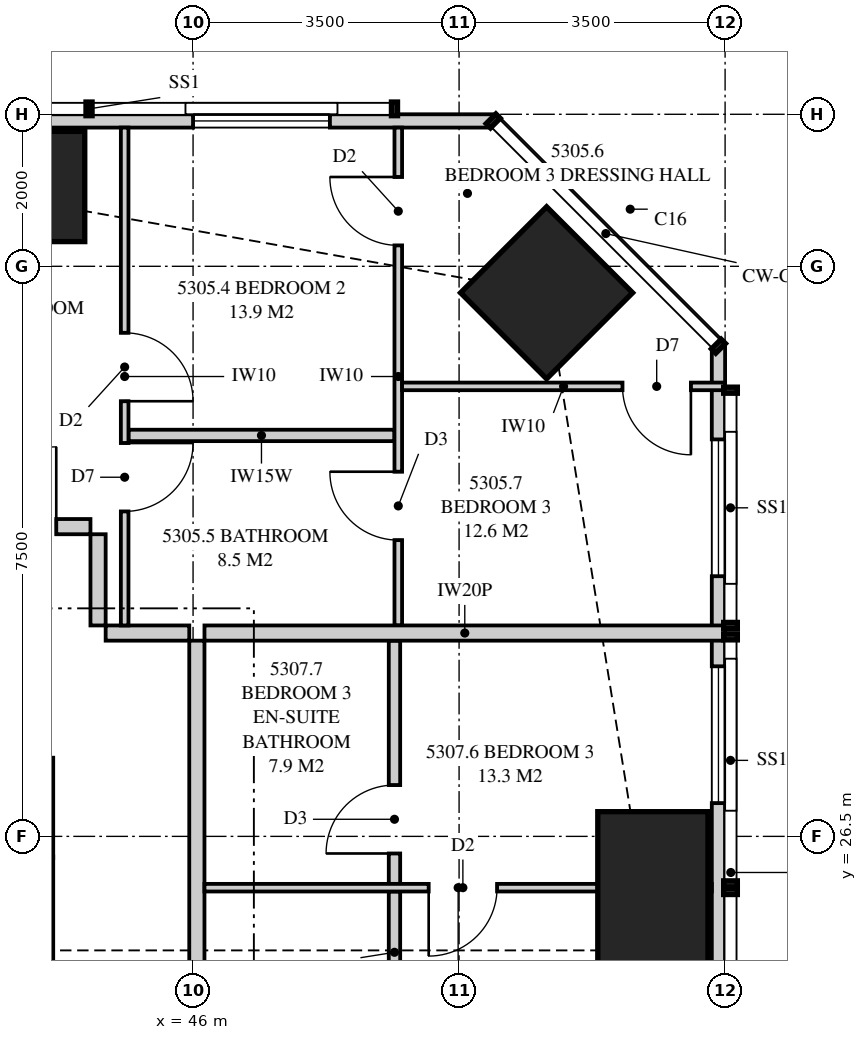
"""IFC4 building model, lengths in metres.
Left out: names, types, materials, properties, quantities, classifications, styles, units other than length and angle.
Written with IfcOpenShell. Run it as: python <this file> out.ifc"""

import sys

from ifc_helpers import new_model, si_unit, direction, frame, frame_2d, origin, origin_2d, place, context, subcontext, project, spatial, polyline, rectangle, outline, extrude, element, fill, save


model = new_model("IFC4")
c1 = context("Model", 3, precision=1e-05, world=origin(), true_north=direction((0.0, 1.0)))
c2 = subcontext(c1, "Body", "Model", "MODEL_VIEW")
j1 = project(units=[si_unit("LENGTHUNIT", "METRE"), si_unit("PLANEANGLEUNIT", "RADIAN")], contexts=[c1])
p1 = place(None, origin())
s1 = spatial("IfcSite", under=j1, at=p1, CompositionType="ELEMENT")
p2 = place(p1, origin())
s2 = spatial("IfcBuilding", under=s1, at=p2, CompositionType="ELEMENT")
p3 = place(p2, frame((0.0, 0.0, 194.55)))
s3 = spatial("IfcBuildingStorey", under=s2, at=p3, CompositionType="ELEMENT", Elevation=194.55)
p4 = place(p3, frame((52.05, 25.0, 0.0), z_axis=(0.0, 0.0, 1.0), x_axis=(1.0, 0.0, 0.0)))
e1 = element("IfcColumn", 1, at=p4, inside=s3, PredefinedType="COLUMN", context=c2, shape_type="SweptSolid", body=[
    extrude(rectangle(XDim=1.45, YDim=3.65, at=origin_2d()), origin(), (0.0, 0.0, 1.0), 3.35),
])
p5 = place(p3, frame((50.652, 33.652, 0.0), z_axis=(0.0, 0.0, 1.0), x_axis=(0.707106781187, 0.707106781187, 0.0)))
e2 = element("IfcColumn", 2, at=p5, inside=s3, PredefinedType="COLUMN", context=c2, shape_type="SweptSolid", body=[
    extrude(rectangle(XDim=1.6, YDim=1.6, at=origin_2d()), origin(), (0.0, 0.0, 1.0), 3.35),
])
p6 = place(p3, frame((42.75, 35.05, 0.0), z_axis=(0.0, 0.0, 1.0), x_axis=(0.0, 1.0, 0.0)))
e3 = element("IfcColumn", 3, at=p6, inside=s3, PredefinedType="COLUMN", context=c2, shape_type="SweptSolid", body=[
    extrude(rectangle(XDim=1.45, YDim=3.65, at=origin_2d()), origin(), (0.0, 0.0, 1.0), 3.35),
])
p7 = place(p3, frame((43.8, 19.3, 0.0), z_axis=(0.0, 0.0, 1.0), x_axis=(0.0, 1.0, 0.0)))
e4 = element("IfcWall", 4, at=p7, inside=s3, PredefinedType="SHEAR", context=c2, shape_type="SweptSolid", body=[
    extrude(rectangle(XDim=6.925, YDim=0.7, at=frame_2d((3.462, 0.0))), origin(), (0.0, 0.0, 1.0), 3.35),
])
p8 = place(p3, frame((52.913, 3.051, 0.0), z_axis=(0.0, 0.0, 1.0), x_axis=(0.0, 1.0, 0.0)))
e5 = element("IfcWall", 5, at=p8, inside=s3, PredefinedType="SOLIDWALL", context=c2, shape_type="SweptSolid", body=[
    extrude(outline(polyline([(0.0, 0.0), (29.897, 0.0), (29.897, 3.11), (22.167, 3.11), (22.167, 2.15), (22.074, 2.15), (22.074, 3.11), (21.949, 3.11), (21.949, 2.15), (9.949, 2.15), (9.949, 3.11), (9.847, 3.11), (9.847, 2.15), (9.706, 2.15), (9.706, 3.11), (0.0, 3.11), (0.0, 0.0)])), frame((0.0, 0.087, 0.0), z_axis=(0.0, -1.0, 0.0), x_axis=(1.0, 0.0, 0.0)), (0.0, 0.0, 1.0), 0.175),
])
p9 = place(p8, frame((5.374, 0.0, 0.4)))
e6 = element("IfcOpeningElement", 6, at=p9, cuts=e5, PredefinedType="OPENING", context=c2, shape_type="SweptSolid", body=[
    extrude(rectangle(XDim=1.8, YDim=1.7, at=frame_2d((0.9, 0.85))), frame((0.0, 0.097, 0.0), z_axis=(0.0, -1.0, 0.0), x_axis=(1.0, 0.0, 0.0)), (0.0, 0.0, 1.0), 0.195),
])
p10 = place(p8, frame((12.199, 0.0, 0.4)))
e7 = element("IfcOpeningElement", 7, at=p10, cuts=e5, PredefinedType="OPENING", context=c2, shape_type="SweptSolid", body=[
    extrude(rectangle(XDim=1.8, YDim=1.7, at=frame_2d((0.9, 0.85))), frame((0.0, 0.097, 0.0), z_axis=(0.0, -1.0, 0.0), x_axis=(1.0, 0.0, 0.0)), (0.0, 0.0, 1.0), 0.195),
])
p11 = place(p8, frame((15.324, 0.0, 0.0)))
e8 = element("IfcOpeningElement", 8, at=p11, cuts=e5, PredefinedType="OPENING", context=c2, shape_type="SweptSolid", body=[
    extrude(rectangle(XDim=1.8, YDim=2.1, at=frame_2d((0.9, 1.05))), frame((0.0, 0.097, 0.0), z_axis=(0.0, -1.0, 0.0), x_axis=(1.0, 0.0, 0.0)), (0.0, 0.0, 1.0), 0.195),
])
p12 = place(p8, frame((18.174, 0.0, 0.4)))
e9 = element("IfcOpeningElement", 9, at=p12, cuts=e5, PredefinedType="OPENING", context=c2, shape_type="SweptSolid", body=[
    extrude(rectangle(XDim=1.8, YDim=1.7, at=frame_2d((0.9, 0.85))), frame((0.0, 0.097, 0.0), z_axis=(0.0, -1.0, 0.0), x_axis=(1.0, 0.0, 0.0)), (0.0, 0.0, 1.0), 0.195),
])
p13 = place(p8, frame((23.886, 0.0, 0.4)))
e10 = element("IfcOpeningElement", 10, at=p13, cuts=e5, PredefinedType="OPENING", context=c2, shape_type="SweptSolid", body=[
    extrude(rectangle(XDim=1.8, YDim=1.7, at=frame_2d((0.9, 0.85))), frame((0.0, 0.097, 0.0), z_axis=(0.0, -1.0, 0.0), x_axis=(1.0, 0.0, 0.0)), (0.0, 0.0, 1.0), 0.195),
])
p14 = place(p8, frame((26.871, 0.0, 0.4)))
e11 = element("IfcOpeningElement", 11, at=p14, cuts=e5, PredefinedType="OPENING", context=c2, shape_type="SweptSolid", body=[
    extrude(rectangle(XDim=1.8, YDim=1.7, at=frame_2d((0.9, 0.85))), frame((0.0, 0.097, 0.0), z_axis=(0.0, -1.0, 0.0), x_axis=(1.0, 0.0, 0.0)), (0.0, 0.0, 1.0), 0.195),
])
p15 = place(p3, frame((49.949, 35.913, 0.0), z_axis=(0.0, 0.0, 1.0), x_axis=(-1.0, 0.0, 0.0)))
e12 = element("IfcWall", 12, at=p15, inside=s3, PredefinedType="SOLIDWALL", context=c2, shape_type="SweptSolid", body=[
    extrude(outline(polyline([(0.0, 0.0), (34.897, 0.0), (34.897, 3.11), (27.91, 3.11), (27.91, 2.15), (27.836, 2.15), (27.836, 3.11), (27.699, 3.11), (27.699, 2.15), (7.199, 2.15), (7.199, 3.11), (7.062, 3.11), (7.062, 2.15), (6.987, 2.15), (6.987, 3.11), (0.0, 3.11), (0.0, 0.0)])), frame((0.0, 0.087, 0.0), z_axis=(0.0, -1.0, 0.0), x_axis=(1.0, 0.0, 0.0)), (0.0, 0.0, 1.0), 0.175),
])
p16 = place(p15, frame((2.149, 0.0, 0.4)))
e13 = element("IfcOpeningElement", 13, at=p16, cuts=e12, PredefinedType="OPENING", context=c2, shape_type="SweptSolid", body=[
    extrude(rectangle(XDim=1.8, YDim=1.7, at=frame_2d((0.9, 0.85))), frame((0.0, 0.097, 0.0), z_axis=(0.0, -1.0, 0.0), x_axis=(1.0, 0.0, 0.0)), (0.0, 0.0, 1.0), 0.195),
])
p17 = place(p15, frame((9.636, 0.0, 0.4)))
e14 = element("IfcOpeningElement", 14, at=p17, cuts=e12, PredefinedType="OPENING", context=c2, shape_type="SweptSolid", body=[
    extrude(rectangle(XDim=1.8, YDim=1.7, at=frame_2d((0.9, 0.85))), frame((0.0, 0.097, 0.0), z_axis=(0.0, -1.0, 0.0), x_axis=(1.0, 0.0, 0.0)), (0.0, 0.0, 1.0), 0.195),
])
p18 = place(p15, frame((13.174, 0.0, 0.0)))
e15 = element("IfcOpeningElement", 15, at=p18, cuts=e12, PredefinedType="OPENING", context=c2, shape_type="SweptSolid", body=[
    extrude(rectangle(XDim=1.8, YDim=2.1, at=frame_2d((0.9, 1.05))), frame((0.0, 0.097, 0.0), z_axis=(0.0, -1.0, 0.0), x_axis=(1.0, 0.0, 0.0)), (0.0, 0.0, 1.0), 0.195),
])
p19 = place(p15, frame((19.374, 0.0, 0.4)))
e16 = element("IfcOpeningElement", 16, at=p19, cuts=e12, PredefinedType="OPENING", context=c2, shape_type="SweptSolid", body=[
    extrude(rectangle(XDim=1.8, YDim=1.7, at=frame_2d((0.9, 0.85))), frame((0.0, 0.097, 0.0), z_axis=(0.0, -1.0, 0.0), x_axis=(1.0, 0.0, 0.0)), (0.0, 0.0, 1.0), 0.195),
])
p20 = place(p15, frame((23.224, 0.0, 0.4)))
e17 = element("IfcOpeningElement", 17, at=p20, cuts=e12, PredefinedType="OPENING", context=c2, shape_type="SweptSolid", body=[
    extrude(rectangle(XDim=2.4, YDim=1.7, at=frame_2d((1.2, 0.85))), frame((0.0, 0.097, 0.0), z_axis=(0.0, -1.0, 0.0), x_axis=(1.0, 0.0, 0.0)), (0.0, 0.0, 1.0), 0.195),
])
p21 = place(p15, frame((32.399, 0.0, 0.4)))
e18 = element("IfcOpeningElement", 18, at=p21, cuts=e12, PredefinedType="OPENING", context=c2, shape_type="SweptSolid", body=[
    extrude(rectangle(XDim=1.8, YDim=1.7, at=frame_2d((0.9, 0.85))), frame((0.0, 0.097, 0.0), z_axis=(0.0, -1.0, 0.0), x_axis=(1.0, 0.0, 0.0)), (0.0, 0.0, 1.0), 0.195),
])
p22 = place(p3, frame((45.1, 35.825, 0.0), z_axis=(0.0, 0.0, 1.0), x_axis=(0.0, -1.0, 0.0)))
e19 = element("IfcWall", 19, at=p22, inside=s3, PredefinedType="PARTITIONING", context=c2, shape_type="SweptSolid", body=[
    extrude(outline(polyline([(0.0, 0.0), (6.55, 0.0), (6.55, 3.11), (2.064, 3.11), (2.064, 2.15), (0.318, 2.15), (0.318, 3.11), (0.0, 3.11), (0.0, 0.0)])), frame((0.0, 0.05, 0.0), z_axis=(0.0, -1.0, 0.0), x_axis=(1.0, 0.0, 0.0)), (0.0, 0.0, 1.0), 0.1),
])
p23 = place(p22, frame((2.7, 0.0, 0.0)))
e20 = element("IfcOpeningElement", 20, at=p23, cuts=e19, PredefinedType="OPENING", context=c2, shape_type="SweptSolid", body=[
    extrude(rectangle(XDim=0.9, YDim=2.1, at=frame_2d((0.45, 1.05))), frame((0.0, 0.06, 0.0), z_axis=(0.0, -1.0, 0.0), x_axis=(1.0, 0.0, 0.0)), (0.0, 0.0, 1.0), 0.12),
])
p24 = place(p22, frame((4.15, 0.0, 0.0)))
e21 = element("IfcOpeningElement", 21, at=p24, cuts=e19, PredefinedType="OPENING", context=c2, shape_type="SweptSolid", body=[
    extrude(rectangle(XDim=0.9, YDim=2.1, at=frame_2d((0.45, 1.05))), frame((0.0, 0.06, 0.0), z_axis=(0.0, -1.0, 0.0), x_axis=(1.0, 0.0, 0.0)), (0.0, 0.0, 1.0), 0.12),
])
p25 = place(p3, frame((48.7, 35.825, 0.0), z_axis=(0.0, 0.0, 1.0), x_axis=(0.0, -1.0, 0.0)))
e22 = element("IfcWall", 22, at=p25, inside=s3, PredefinedType="PARTITIONING", context=c2, shape_type="SweptSolid", body=[
    extrude(outline(polyline([(0.0, 0.0), (6.55, 0.0), (6.55, 3.11), (2.701, 3.11), (2.701, 2.15), (0.955, 2.15), (0.955, 3.11), (0.0, 3.11), (0.0, 0.0)])), frame((0.0, 0.05, 0.0), z_axis=(0.0, -1.0, 0.0), x_axis=(1.0, 0.0, 0.0)), (0.0, 0.0, 1.0), 0.1),
])
p26 = place(p25, frame((0.65, 0.0, 0.0)))
e23 = element("IfcOpeningElement", 23, at=p26, cuts=e22, PredefinedType="OPENING", context=c2, shape_type="SweptSolid", body=[
    extrude(rectangle(XDim=0.9, YDim=2.1, at=frame_2d((0.45, 1.05))), frame((0.0, 0.06, 0.0), z_axis=(0.0, -1.0, 0.0), x_axis=(1.0, 0.0, 0.0)), (0.0, 0.0, 1.0), 0.12),
])
p27 = place(p25, frame((4.527, 0.0, 0.0)))
e24 = element("IfcOpeningElement", 24, at=p27, cuts=e22, PredefinedType="OPENING", context=c2, shape_type="SweptSolid", body=[
    extrude(rectangle(XDim=0.9, YDim=2.1, at=frame_2d((0.45, 1.05))), frame((0.0, 0.06, 0.0), z_axis=(0.0, -1.0, 0.0), x_axis=(1.0, 0.0, 0.0)), (0.0, 0.0, 1.0), 0.12),
])
p28 = place(p3, frame((45.15, 31.775, 0.0), z_axis=(0.0, 0.0, 1.0), x_axis=(1.0, 0.0, 0.0)))
e25 = element("IfcWall", 25, at=p28, inside=s3, PredefinedType="PLUMBINGWALL", context=c2, shape_type="SweptSolid", body=[
    extrude(rectangle(XDim=3.5, YDim=0.15, at=frame_2d((1.75, 0.0))), origin(), (0.0, 0.0, 1.0), 3.11),
])
p29 = place(p3, frame((48.75, 32.42, 0.0), z_axis=(0.0, 0.0, 1.0), x_axis=(1.0, 0.0, 0.0)))
e26 = element("IfcWall", 26, at=p29, inside=s3, PredefinedType="PARTITIONING", context=c2, shape_type="SweptSolid", body=[
    extrude(outline(polyline([(0.0, 0.0), (4.25, 0.0), (4.25, 3.11), (2.972, 3.11), (2.972, 2.15), (1.229, 2.15), (1.229, 3.11), (0.0, 3.11), (0.0, 0.0)])), frame((0.0, 0.05, 0.0), z_axis=(0.0, -1.0, 0.0), x_axis=(1.0, 0.0, 0.0)), (0.0, 0.0, 1.0), 0.1),
])
p30 = place(p29, frame((2.9, 0.0, 0.0)))
e27 = element("IfcOpeningElement", 27, at=p30, cuts=e26, PredefinedType="OPENING", context=c2, shape_type="SweptSolid", body=[
    extrude(rectangle(XDim=0.9, YDim=2.1, at=frame_2d((0.45, 1.05))), frame((0.0, 0.06, 0.0), z_axis=(0.0, -1.0, 0.0), x_axis=(1.0, 0.0, 0.0)), (0.0, 0.0, 1.0), 0.12),
])
p31 = place(p3, frame((46.15, 29.175, 0.0), z_axis=(0.0, 0.0, 1.0), x_axis=(1.0, 0.0, 0.0)))
e28 = element("IfcWall", 28, at=p31, inside=s3, PredefinedType="PARTITIONING", context=c2, shape_type="SweptSolid", body=[
    extrude(outline(polyline([(0.0, 0.0), (6.85, 0.0), (6.85, 3.11), (6.147, 3.11), (6.147, 2.15), (4.303, 2.15), (4.303, 3.11), (0.0, 3.11), (0.0, 0.0)])), frame((0.0, 0.1, 0.0), z_axis=(0.0, -1.0, 0.0), x_axis=(1.0, 0.0, 0.0)), (0.0, 0.0, 1.0), 0.2),
])
p32 = place(p3, frame((46.05, 7.925, 0.0), z_axis=(0.0, 0.0, 1.0), x_axis=(0.0, 1.0, 0.0)))
e29 = element("IfcWall", 29, at=p32, inside=s3, PredefinedType="PARTITIONING", context=c2, shape_type="SweptSolid", body=[
    extrude(outline(polyline([(0.0, 0.0), (21.15, 0.0), (21.15, 3.11), (17.412, 3.11), (17.412, 2.541), (16.738, 2.541), (16.738, 3.11), (5.412, 3.11), (5.412, 2.541), (4.738, 2.541), (4.738, 3.11), (0.0, 3.11), (0.0, 0.0)])), frame((0.0, 0.1, 0.0), z_axis=(0.0, -1.0, 0.0), x_axis=(1.0, 0.0, 0.0)), (0.0, 0.0, 1.0), 0.2),
])
p33 = place(p32, frame((10.075, 0.0, 0.0)))
e30 = element("IfcOpeningElement", 30, at=p33, cuts=e29, PredefinedType="OPENING", context=c2, shape_type="SweptSolid", body=[
    extrude(rectangle(XDim=1.05, YDim=2.2, at=frame_2d((0.525, 1.1))), frame((0.0, 0.11, 0.0), z_axis=(0.0, -1.0, 0.0), x_axis=(1.0, 0.0, 0.0)), (0.0, 0.0, 1.0), 0.22),
])
p34 = place(p3, frame((52.825, 25.825, 0.0), z_axis=(0.0, 0.0, 1.0), x_axis=(-1.0, 0.0, 0.0)))
e31 = element("IfcWall", 31, at=p34, inside=s3, PredefinedType="PARTITIONING", context=c2, shape_type="SweptSolid", body=[
    extrude(outline(polyline([(0.037, 3.11), (0.0, 3.11), (0.0, 0.0), (0.529, 0.0), (0.529, 0.664), (1.021, 0.664), (1.021, 0.0), (6.675, 0.0), (6.675, 3.11), (1.78, 3.11), (1.78, 2.15), (1.021, 2.15), (1.021, 1.486), (0.529, 1.486), (0.529, 2.15), (0.037, 2.15), (0.037, 3.11)])), frame((0.0, 0.05, 0.0), z_axis=(0.0, -1.0, 0.0), x_axis=(1.0, 0.0, 0.0)), (0.0, 0.0, 1.0), 0.1),
])
p35 = place(p34, frame((2.825, 0.0, 0.0)))
e32 = element("IfcOpeningElement", 32, at=p35, cuts=e31, PredefinedType="OPENING", context=c2, shape_type="SweptSolid", body=[
    extrude(rectangle(XDim=0.9, YDim=2.1, at=frame_2d((0.45, 1.05))), frame((0.0, 0.06, 0.0), z_axis=(0.0, -1.0, 0.0), x_axis=(1.0, 0.0, 0.0)), (0.0, 0.0, 1.0), 0.12),
])
p36 = place(p3, frame((48.65, 20.875, 0.0), z_axis=(0.0, 0.0, 1.0), x_axis=(0.0, 1.0, 0.0)))
e33 = element("IfcWall", 33, at=p36, inside=s3, PredefinedType="PLUMBINGWALL", context=c2, shape_type="SweptSolid", body=[
    extrude(outline(polyline([(0.0, 0.0), (4.9, 0.0), (4.9, 3.11), (4.438, 3.11), (4.438, 2.541), (3.812, 2.541), (3.812, 3.11), (0.0, 3.11), (0.0, 0.0)])), frame((0.0, 0.075, 0.0), z_axis=(0.0, -1.0, 0.0), x_axis=(1.0, 0.0, 0.0)), (0.0, 0.0, 1.0), 0.15),
])
p37 = place(p3, frame((48.65, 25.875, 0.0), z_axis=(0.0, 0.0, 1.0), x_axis=(0.0, 1.0, 0.0)))
e34 = element("IfcWall", 34, at=p37, inside=s3, PredefinedType="PLUMBINGWALL", context=c2, shape_type="SweptSolid", body=[
    extrude(rectangle(XDim=3.2, YDim=0.15, at=frame_2d((1.6, 0.0))), origin(), (0.0, 0.0, 1.0), 3.11),
])
p38 = place(p37, frame((0.4, 0.0, 0.0)))
e35 = element("IfcOpeningElement", 35, at=p38, cuts=e34, PredefinedType="OPENING", context=c2, shape_type="SweptSolid", body=[
    extrude(rectangle(XDim=0.9, YDim=2.1, at=frame_2d((0.45, 1.05))), frame((0.0, 0.085, 0.0), z_axis=(0.0, -1.0, 0.0), x_axis=(1.0, 0.0, 0.0)), (0.0, 0.0, 1.0), 0.17),
])
p39 = place(p3, frame((44.85, 29.175, 0.0), z_axis=(0.0, 0.0, 1.0), x_axis=(1.0, 0.0, 0.0)))
e36 = element("IfcWall", 36, at=p39, inside=s3, PredefinedType="PARTITIONING", context=c2, shape_type="SweptSolid", body=[
    extrude(rectangle(XDim=1.1, YDim=0.2, at=frame_2d((0.55, 0.0))), origin(), (0.0, 0.0, 1.0), 3.11),
])
p40 = place(p3, frame((42.25, 30.575, 0.0), z_axis=(0.0, 0.0, 1.0), x_axis=(1.0, 0.0, 0.0)))
e37 = element("IfcWall", 37, at=p40, inside=s3, PredefinedType="PARTITIONING", context=c2, shape_type="SweptSolid", body=[
    extrude(outline(polyline([(0.0, 0.0), (2.4, 0.0), (2.4, 3.11), (0.837, 3.11), (0.837, 2.541), (0.163, 2.541), (0.163, 3.11), (0.0, 3.11), (0.0, 0.0)])), frame((0.0, 0.1, 0.0), z_axis=(0.0, -1.0, 0.0), x_axis=(1.0, 0.0, 0.0)), (0.0, 0.0, 1.0), 0.2),
])
p41 = place(p40, frame((0.9, 0.0, 0.0)))
e38 = element("IfcOpeningElement", 38, at=p41, cuts=e37, PredefinedType="OPENING", context=c2, shape_type="SweptSolid", body=[
    extrude(rectangle(XDim=1.05, YDim=2.2, at=frame_2d((0.525, 1.1))), frame((0.0, 0.11, 0.0), z_axis=(0.0, -1.0, 0.0), x_axis=(1.0, 0.0, 0.0)), (0.0, 0.0, 1.0), 0.22),
])
p42 = place(p3, frame((44.75, 29.275, 0.0), z_axis=(0.0, 0.0, 1.0), x_axis=(0.0, 1.0, 0.0)))
e39 = element("IfcWall", 39, at=p42, inside=s3, PredefinedType="PARTITIONING", context=c2, shape_type="SweptSolid", body=[
    extrude(rectangle(XDim=1.2, YDim=0.2, at=frame_2d((0.6, 0.0))), origin(), (0.0, 0.0, 1.0), 3.11),
])
p43 = place(p13, origin())
e40 = element("IfcWindow", 40, at=p43, inside=s3, PartitioningType="SINGLE_PANEL", PredefinedType="WINDOW", context=c2, shape_type="SweptSolid", body=[
    extrude(rectangle(XDim=1.8, YDim=1.7, at=frame_2d((0.9, 0.85))), frame((0.0, 0.03, 0.0), z_axis=(0.0, -1.0, 0.0), x_axis=(1.0, 0.0, 0.0)), (0.0, 0.0, 1.0), 0.06),
])
fill(e10, e40)
p44 = place(p14, origin())
e41 = element("IfcWindow", 41, at=p44, inside=s3, PartitioningType="SINGLE_PANEL", PredefinedType="WINDOW", context=c2, shape_type="SweptSolid", body=[
    extrude(rectangle(XDim=1.8, YDim=1.7, at=frame_2d((0.9, 0.85))), frame((0.0, 0.03, 0.0), z_axis=(0.0, -1.0, 0.0), x_axis=(1.0, 0.0, 0.0)), (0.0, 0.0, 1.0), 0.06),
])
fill(e11, e41)
p45 = place(p16, origin())
e42 = element("IfcWindow", 42, at=p45, inside=s3, PartitioningType="SINGLE_PANEL", PredefinedType="WINDOW", context=c2, shape_type="SweptSolid", body=[
    extrude(rectangle(XDim=1.8, YDim=1.7, at=frame_2d((0.9, 0.85))), frame((0.0, 0.03, 0.0), z_axis=(0.0, -1.0, 0.0), x_axis=(1.0, 0.0, 0.0)), (0.0, 0.0, 1.0), 0.06),
])
fill(e13, e42)
p46 = place(p41, origin())
e43 = element("IfcDoor", 43, at=p46, inside=s3, OperationType="SINGLE_SWING_RIGHT", PredefinedType="DOOR", context=c2, shape_type="SweptSolid", body=[
    extrude(rectangle(XDim=1.05, YDim=2.2, at=frame_2d((0.525, 1.1))), frame((0.0, 0.025, 0.0), z_axis=(0.0, -1.0, 0.0), x_axis=(1.0, 0.0, 0.0)), (0.0, 0.0, 1.0), 0.05),
])
fill(e38, e43)
p47 = place(p23, origin())
e44 = element("IfcDoor", 44, at=p47, inside=s3, OperationType="SINGLE_SWING_RIGHT", PredefinedType="DOOR", context=c2, shape_type="SweptSolid", body=[
    extrude(rectangle(XDim=0.9, YDim=2.1, at=frame_2d((0.45, 1.05))), frame((0.0, 0.025, 0.0), z_axis=(0.0, -1.0, 0.0), x_axis=(1.0, 0.0, 0.0)), (0.0, 0.0, 1.0), 0.05),
])
fill(e20, e44)
p48 = place(p24, origin())
e45 = element("IfcDoor", 45, at=p48, inside=s3, OperationType="SINGLE_SWING_LEFT", PredefinedType="DOOR", context=c2, shape_type="SweptSolid", body=[
    extrude(rectangle(XDim=0.9, YDim=2.1, at=frame_2d((0.45, 1.05))), frame((0.0, 0.025, 0.0), z_axis=(0.0, -1.0, 0.0), x_axis=(1.0, 0.0, 0.0)), (0.0, 0.0, 1.0), 0.05),
])
fill(e21, e45)
p49 = place(p30, frame((0.9, 0.0, 0.0), z_axis=(0.0, 0.0, 1.0), x_axis=(-1.0, 0.0, 0.0)))
e46 = element("IfcDoor", 46, at=p49, inside=s3, OperationType="SINGLE_SWING_LEFT", PredefinedType="DOOR", context=c2, shape_type="SweptSolid", body=[
    extrude(rectangle(XDim=0.9, YDim=2.1, at=frame_2d((0.45, 1.05))), frame((0.0, 0.025, 0.0), z_axis=(0.0, -1.0, 0.0), x_axis=(1.0, 0.0, 0.0)), (0.0, 0.0, 1.0), 0.05),
])
fill(e27, e46)
p50 = place(p26, frame((0.9, 0.0, 0.0), z_axis=(0.0, 0.0, 1.0), x_axis=(-1.0, 0.0, 0.0)))
e47 = element("IfcDoor", 47, at=p50, inside=s3, OperationType="SINGLE_SWING_RIGHT", PredefinedType="DOOR", context=c2, shape_type="SweptSolid", body=[
    extrude(rectangle(XDim=0.9, YDim=2.1, at=frame_2d((0.45, 1.05))), frame((0.0, 0.025, 0.0), z_axis=(0.0, -1.0, 0.0), x_axis=(1.0, 0.0, 0.0)), (0.0, 0.0, 1.0), 0.05),
])
fill(e23, e47)
p51 = place(p27, frame((0.9, 0.0, 0.0), z_axis=(0.0, 0.0, 1.0), x_axis=(-1.0, 0.0, 0.0)))
e48 = element("IfcDoor", 48, at=p51, inside=s3, OperationType="SINGLE_SWING_RIGHT", PredefinedType="DOOR", context=c2, shape_type="SweptSolid", body=[
    extrude(rectangle(XDim=0.9, YDim=2.1, at=frame_2d((0.45, 1.05))), frame((0.0, 0.025, 0.0), z_axis=(0.0, -1.0, 0.0), x_axis=(1.0, 0.0, 0.0)), (0.0, 0.0, 1.0), 0.05),
])
fill(e24, e48)
p52 = place(p35, origin())
e49 = element("IfcDoor", 49, at=p52, inside=s3, OperationType="SINGLE_SWING_RIGHT", PredefinedType="DOOR", context=c2, shape_type="SweptSolid", body=[
    extrude(rectangle(XDim=0.9, YDim=2.1, at=frame_2d((0.45, 1.05))), frame((0.0, 0.025, 0.0), z_axis=(0.0, -1.0, 0.0), x_axis=(1.0, 0.0, 0.0)), (0.0, 0.0, 1.0), 0.05),
])
fill(e32, e49)
p53 = place(p38, origin())
e50 = element("IfcDoor", 50, at=p53, inside=s3, OperationType="SINGLE_SWING_LEFT", PredefinedType="DOOR", context=c2, shape_type="SweptSolid", body=[
    extrude(rectangle(XDim=0.9, YDim=2.1, at=frame_2d((0.45, 1.05))), frame((0.0, 0.025, 0.0), z_axis=(0.0, -1.0, 0.0), x_axis=(1.0, 0.0, 0.0)), (0.0, 0.0, 1.0), 0.05),
])
fill(e35, e50)
save(model, sys.argv[1])
